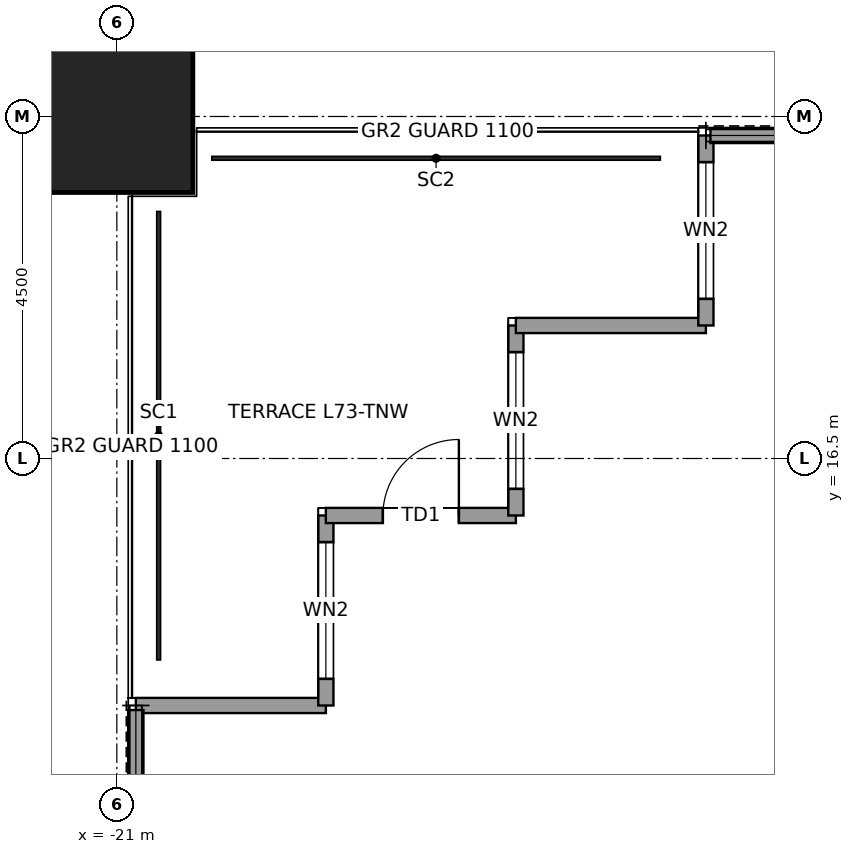
"""IFC4 building model, lengths in metres.
Left out: names, types, materials, properties, quantities, classifications, styles, units other than length and angle.
Written with IfcOpenShell. Run it as: python <this file> out.ifc"""

import sys

from ifc_helpers import new_model, si_unit, direction, frame, frame_2d, origin, origin_2d, place, context, subcontext, project, spatial, rectangle, hollow_rectangle, extrude, element, fill, save


model = new_model("IFC4")
c1 = context("Model", 3, precision=1e-05, world=origin(), true_north=direction((0.0, 1.0)))
c2 = subcontext(c1, "Body", "Model", "MODEL_VIEW")
j1 = project(units=[si_unit("LENGTHUNIT", "METRE"), si_unit("PLANEANGLEUNIT", "RADIAN")], contexts=[c1])
p1 = place(None, origin())
s1 = spatial("IfcSite", under=j1, at=p1, CompositionType="ELEMENT")
p2 = place(p1, origin())
s2 = spatial("IfcBuilding", under=s1, at=p2, CompositionType="ELEMENT")
p3 = place(p2, frame((0.0, 0.0, 327.9)))
s3 = spatial("IfcBuildingStorey", under=s2, at=p3, CompositionType="ELEMENT", Elevation=327.9)
p4 = place(p3, frame((-21.0, 21.0, 0.0), z_axis=(0.0, 0.0, 1.0), x_axis=(1.0, 0.0, 0.0)))
e1 = element("IfcColumn", 1, at=p4, inside=s3, PredefinedType="COLUMN", context=c2, shape_type="SweptSolid", body=[
    extrude(hollow_rectangle(XDim=2.0, YDim=2.0, WallThickness=0.095, at=origin_2d()), origin(), (0.0, 0.0, 1.0), 4.0),
])
p5 = place(p3, frame((-20.75, 13.25, 0.0), z_axis=(0.0, 0.0, 1.0), x_axis=(1.0, 0.0, 0.0)))
e2 = element("IfcWall", 2, at=p5, inside=s3, PredefinedType="SOLIDWALL", context=c2, shape_type="SweptSolid", body=[
    extrude(rectangle(XDim=2.5, YDim=0.2, at=frame_2d((1.25, 0.0))), origin(), (0.0, 0.0, 1.0), 3.85),
])
p6 = place(p3, frame((-18.25, 13.25, 0.0), z_axis=(0.0, 0.0, 1.0), x_axis=(0.0, 1.0, 0.0)))
e3 = element("IfcWall", 3, at=p6, inside=s3, PredefinedType="SOLIDWALL", context=c2, shape_type="SweptSolid", body=[
    extrude(rectangle(XDim=2.5, YDim=0.2, at=frame_2d((1.25, 0.0))), origin(), (0.0, 0.0, 1.0), 3.85),
])
p7 = place(p6, frame((0.35, 0.0, 0.3)))
e4 = element("IfcOpeningElement", 4, at=p7, cuts=e3, PredefinedType="OPENING", context=c2, shape_type="SweptSolid", body=[
    extrude(rectangle(XDim=1.8, YDim=2.4, at=frame_2d((0.9, 1.2))), frame((0.0, 0.11, 0.0), z_axis=(0.0, -1.0, 0.0), x_axis=(1.0, 0.0, 0.0)), (0.0, 0.0, 1.0), 0.22),
])
p8 = place(p3, frame((-18.25, 15.75, 0.0), z_axis=(0.0, 0.0, 1.0), x_axis=(1.0, 0.0, 0.0)))
e5 = element("IfcWall", 5, at=p8, inside=s3, PredefinedType="SOLIDWALL", context=c2, shape_type="SweptSolid", body=[
    extrude(rectangle(XDim=2.5, YDim=0.2, at=frame_2d((1.25, 0.0))), origin(), (0.0, 0.0, 1.0), 3.317),
])
p9 = place(p8, frame((0.75, 0.0, 0.0)))
e6 = element("IfcOpeningElement", 6, at=p9, cuts=e5, PredefinedType="OPENING", context=c2, shape_type="SweptSolid", body=[
    extrude(rectangle(XDim=1.0, YDim=2.4, at=frame_2d((0.5, 1.2))), frame((0.0, 0.11, 0.0), z_axis=(0.0, -1.0, 0.0), x_axis=(1.0, 0.0, 0.0)), (0.0, 0.0, 1.0), 0.22),
])
p10 = place(p3, frame((-15.75, 15.75, 0.0), z_axis=(0.0, 0.0, 1.0), x_axis=(0.0, 1.0, 0.0)))
e7 = element("IfcWall", 7, at=p10, inside=s3, PredefinedType="SOLIDWALL", context=c2, shape_type="SweptSolid", body=[
    extrude(rectangle(XDim=2.5, YDim=0.2, at=frame_2d((1.25, 0.0))), origin(), (0.0, 0.0, 1.0), 3.85),
])
p11 = place(p10, frame((0.35, 0.0, 0.3)))
e8 = element("IfcOpeningElement", 8, at=p11, cuts=e7, PredefinedType="OPENING", context=c2, shape_type="SweptSolid", body=[
    extrude(rectangle(XDim=1.8, YDim=2.4, at=frame_2d((0.9, 1.2))), frame((0.0, 0.11, 0.0), z_axis=(0.0, -1.0, 0.0), x_axis=(1.0, 0.0, 0.0)), (0.0, 0.0, 1.0), 0.22),
])
p12 = place(p3, frame((-15.75, 18.25, 0.0), z_axis=(0.0, 0.0, 1.0), x_axis=(1.0, 0.0, 0.0)))
e9 = element("IfcWall", 9, at=p12, inside=s3, PredefinedType="SOLIDWALL", context=c2, shape_type="SweptSolid", body=[
    extrude(rectangle(XDim=2.5, YDim=0.2, at=frame_2d((1.25, 0.0))), origin(), (0.0, 0.0, 1.0), 3.85),
])
p13 = place(p3, frame((-13.25, 18.25, 0.0), z_axis=(0.0, 0.0, 1.0), x_axis=(0.0, 1.0, 0.0)))
e10 = element("IfcWall", 10, at=p13, inside=s3, PredefinedType="SOLIDWALL", context=c2, shape_type="SweptSolid", body=[
    extrude(rectangle(XDim=2.5, YDim=0.2, at=frame_2d((1.25, 0.0))), origin(), (0.0, 0.0, 1.0), 3.85),
])
p14 = place(p13, frame((0.35, 0.0, 0.3)))
e11 = element("IfcOpeningElement", 11, at=p14, cuts=e10, PredefinedType="OPENING", context=c2, shape_type="SweptSolid", body=[
    extrude(rectangle(XDim=1.8, YDim=2.4, at=frame_2d((0.9, 1.2))), frame((0.0, 0.11, 0.0), z_axis=(0.0, -1.0, 0.0), x_axis=(1.0, 0.0, 0.0)), (0.0, 0.0, 1.0), 0.22),
])
for number, where, z_axis, x_axis in (
    (12, (-13.19, 20.75, 0.0), (0.0, 0.0, 1.0), (1.0, 0.0, 0.0)),
    (13, (-20.75, 10.435, 0.0), (0.0, 0.0, 1.0), (0.0, 1.0, 0.0)),
):
    element("IfcWall", number, at=place(p3, frame(where, z_axis=z_axis, x_axis=x_axis)), inside=s3, PredefinedType="SOLIDWALL", context=c2, shape_type="SweptSolid", body=[
        extrude(rectangle(XDim=2.755, YDim=0.2, at=frame_2d((1.377, 0.0))), origin(), (0.0, 0.0, 1.0), 3.85),
    ])
p15 = place(p7, origin())
e14 = element("IfcWindow", 14, at=p15, inside=s3, PartitioningType="SINGLE_PANEL", PredefinedType="WINDOW", context=c2, shape_type="SweptSolid", body=[
    extrude(rectangle(XDim=1.8, YDim=2.4, at=frame_2d((0.9, 1.2))), frame((0.0, 0.03, 0.0), z_axis=(0.0, -1.0, 0.0), x_axis=(1.0, 0.0, 0.0)), (0.0, 0.0, 1.0), 0.06),
])
fill(e4, e14)
p16 = place(p9, origin())
e15 = element("IfcDoor", 15, at=p16, inside=s3, OperationType="SINGLE_SWING_RIGHT", PredefinedType="DOOR", context=c2, shape_type="SweptSolid", body=[
    extrude(rectangle(XDim=1.0, YDim=2.4, at=frame_2d((0.5, 1.2))), frame((0.0, 0.025, 0.0), z_axis=(0.0, -1.0, 0.0), x_axis=(1.0, 0.0, 0.0)), (0.0, 0.0, 1.0), 0.05),
])
fill(e6, e15)
p17 = place(p11, origin())
e16 = element("IfcWindow", 16, at=p17, inside=s3, PartitioningType="SINGLE_PANEL", PredefinedType="WINDOW", context=c2, shape_type="SweptSolid", body=[
    extrude(rectangle(XDim=1.8, YDim=2.4, at=frame_2d((0.9, 1.2))), frame((0.0, 0.03, 0.0), z_axis=(0.0, -1.0, 0.0), x_axis=(1.0, 0.0, 0.0)), (0.0, 0.0, 1.0), 0.06),
])
fill(e8, e16)
p18 = place(p14, origin())
e17 = element("IfcWindow", 17, at=p18, inside=s3, PartitioningType="SINGLE_PANEL", PredefinedType="WINDOW", context=c2, shape_type="SweptSolid", body=[
    extrude(rectangle(XDim=1.8, YDim=2.4, at=frame_2d((0.9, 1.2))), frame((0.0, 0.03, 0.0), z_axis=(0.0, -1.0, 0.0), x_axis=(1.0, 0.0, 0.0)), (0.0, 0.0, 1.0), 0.06),
])
fill(e11, e17)
save(model, sys.argv[1])
